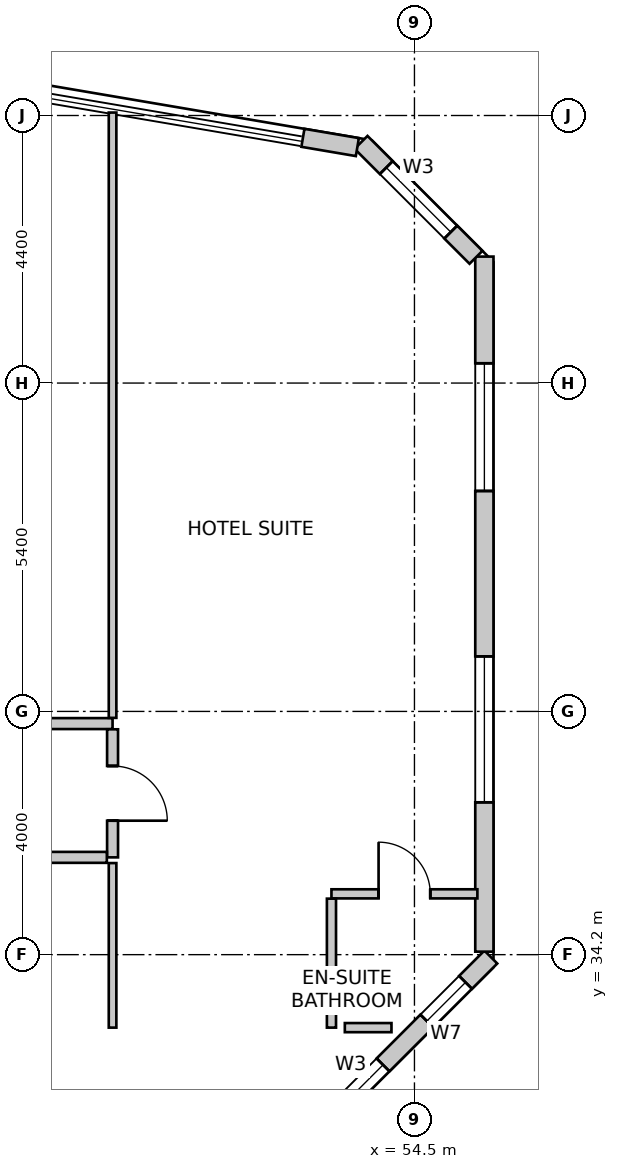
"""IFC4 building model, lengths in metres.
Left out: names, types, materials, properties, quantities, classifications, styles, units other than length and angle.
Written with IfcOpenShell. Run it as: python <this file> out.ifc"""

import sys

from ifc_helpers import new_model, si_unit, direction, frame, frame_2d, origin, place, context, subcontext, project, spatial, rectangle, extrude, source, transform, mapped, element, fill, save


model = new_model("IFC4")
c1 = context("Model", 3, precision=1e-05, world=origin(), true_north=direction((0.0, 1.0)))
c2 = subcontext(c1, "Body", "Model", "MODEL_VIEW")
j1 = project(units=[si_unit("LENGTHUNIT", "METRE"), si_unit("PLANEANGLEUNIT", "RADIAN")], contexts=[c1])
p1 = place(None, origin())
s1 = spatial("IfcSite", under=j1, at=p1, CompositionType="ELEMENT")
p2 = place(p1, origin())
s2 = spatial("IfcBuilding", under=s1, at=p2, CompositionType="ELEMENT")
p3 = place(p2, frame((0.0, 0.0, 146.6)))
s3 = spatial("IfcBuildingStorey", under=s2, at=p3, CompositionType="ELEMENT", Elevation=146.6)
p4 = place(p3, frame((52.476, 30.88, 0.0), z_axis=(0.0, 0.0, 1.0), x_axis=(0.707106781187, 0.707106781187, 0.0)))
e1 = element("IfcWall", 1, at=p4, inside=s3, PredefinedType="SOLIDWALL", context=c2, shape_type="SweptSolid", body=[
    extrude(rectangle(XDim=4.639, YDim=0.3, at=frame_2d((2.319, 0.0))), origin(), (0.0, 0.0, 1.0), 3.35),
])
m1 = source(origin(), c2, "Body", "SweptSolid", [
    extrude(rectangle(XDim=1.5, YDim=1.8, at=frame_2d((0.75, 0.9))), frame((0.0, 0.16, 0.0), z_axis=(0.0, -1.0, 0.0), x_axis=(1.0, 0.0, 0.0)), (0.0, 0.0, 1.0), 0.32),
])
p5 = place(p4, frame((0.632, 0.0, 0.85)))
e2 = element("IfcOpeningElement", 2, at=p5, cuts=e1, PredefinedType="OPENING", context=c2, shape_type="MappedRepresentation", body=[
    mapped(m1, transform((0.0, 0.0, 0.0), scale=1.0)),
])
m2 = source(origin(), c2, "Body", "SweptSolid", [
    extrude(rectangle(XDim=0.9, YDim=1.6, at=frame_2d((0.45, 0.8))), frame((0.0, 0.16, 0.0), z_axis=(0.0, -1.0, 0.0), x_axis=(1.0, 0.0, 0.0)), (0.0, 0.0, 1.0), 0.32),
])
p6 = place(p4, frame((3.151, 0.0, 0.85)))
e3 = element("IfcOpeningElement", 3, at=p6, cuts=e1, PredefinedType="OPENING", context=c2, shape_type="MappedRepresentation", body=[
    mapped(m2, transform((0.0, 0.0, 0.0), scale=1.0)),
])
p7 = place(p3, frame((55.65, 34.249, 0.0), z_axis=(0.0, 0.0, 1.0), x_axis=(0.0, 1.0, 0.0)))
e4 = element("IfcWall", 4, at=p7, inside=s3, PredefinedType="SOLIDWALL", context=c2, shape_type="SweptSolid", body=[
    extrude(rectangle(XDim=11.431, YDim=0.3, at=frame_2d((5.715, 0.0))), origin(), (0.0, 0.0, 1.0), 3.35),
])
m3 = source(origin(), c2, "Body", "SweptSolid", [
    extrude(rectangle(XDim=2.4, YDim=2.2, at=frame_2d((1.2, 1.1))), frame((0.0, 0.16, 0.0), z_axis=(0.0, -1.0, 0.0), x_axis=(1.0, 0.0, 0.0)), (0.0, 0.0, 1.0), 0.32),
])
p8 = place(p7, frame((2.456, 0.0, 0.85)))
e5 = element("IfcOpeningElement", 5, at=p8, cuts=e4, PredefinedType="OPENING", context=c2, shape_type="MappedRepresentation", body=[
    mapped(m3, transform((0.0, 0.0, 0.0), scale=1.0)),
])
m4 = source(origin(), c2, "Body", "SweptSolid", [
    extrude(rectangle(XDim=2.1, YDim=2.0, at=frame_2d((1.05, 1.0))), frame((0.0, 0.16, 0.0), z_axis=(0.0, -1.0, 0.0), x_axis=(1.0, 0.0, 0.0)), (0.0, 0.0, 1.0), 0.32),
])
p9 = place(p7, frame((7.576, 0.0, 0.85)))
e6 = element("IfcOpeningElement", 6, at=p9, cuts=e4, PredefinedType="OPENING", context=c2, shape_type="MappedRepresentation", body=[
    mapped(m4, transform((0.0, 0.0, 0.0), scale=1.0)),
])
p10 = place(p3, frame((55.512, 45.668, 0.0), z_axis=(0.0, 0.0, 1.0), x_axis=(-0.707152443695, 0.707061115729, 0.0)))
e7 = element("IfcWall", 7, at=p10, inside=s3, PredefinedType="SOLIDWALL", context=c2, shape_type="SweptSolid", body=[
    extrude(rectangle(XDim=2.673, YDim=0.3, at=frame_2d((1.337, 0.0))), origin(), (0.0, 0.0, 1.0), 3.35),
])
p11 = place(p10, frame((0.587, 0.0, 0.85)))
e8 = element("IfcOpeningElement", 8, at=p11, cuts=e7, PredefinedType="OPENING", context=c2, shape_type="MappedRepresentation", body=[
    mapped(m1, transform((0.0, 0.0, 0.0), scale=1.0)),
])
p12 = place(p3, frame((53.561, 47.48, 0.0), z_axis=(0.0, 0.0, 1.0), x_axis=(-0.985836300899, 0.167710428506, 0.0)))
e9 = element("IfcWall", 9, at=p12, inside=s3, PredefinedType="SOLIDWALL", context=c2, shape_type="SweptSolid", body=[
    extrude(rectangle(XDim=0.908, YDim=0.3, at=frame_2d((0.454, 0.0))), origin(), (0.0, 0.0, 1.0), 3.35),
])
p13 = place(p3, frame((41.829, 38.0, 0.0), z_axis=(0.0, 0.0, 1.0), x_axis=(1.0, 0.0, 0.0)))
e10 = element("IfcWall", 10, at=p13, inside=s3, PredefinedType="PARTITIONING", context=c2, shape_type="SweptSolid", body=[
    extrude(rectangle(XDim=7.706, YDim=0.18, at=frame_2d((3.853, 0.0))), origin(), (0.0, 0.0, 1.0), 2.788),
])
m5 = source(origin(), c2, "Body", "SweptSolid", [
    extrude(rectangle(XDim=0.9, YDim=2.15, at=frame_2d((0.45, 1.075))), frame((0.0, 0.1, 0.0), z_axis=(0.0, -1.0, 0.0), x_axis=(1.0, 0.0, 0.0)), (0.0, 0.0, 1.0), 0.2),
])
p14 = place(p13, frame((3.403, 0.0, 0.0)))
e11 = element("IfcOpeningElement", 11, at=p14, cuts=e10, PredefinedType="OPENING", context=c2, shape_type="MappedRepresentation", body=[
    mapped(m5, transform((0.0, 0.0, 0.0), scale=1.0)),
])
p15 = place(p3, frame((49.535, 37.906, 0.0), z_axis=(0.0, 0.0, 1.0), x_axis=(0.0, -1.0, 0.0)))
e12 = element("IfcWall", 12, at=p15, inside=s3, PredefinedType="PARTITIONING", context=c2, shape_type="SweptSolid", body=[
    extrude(rectangle(XDim=2.106, YDim=0.18, at=frame_2d((1.053, 0.0))), origin(), (0.0, 0.0, 1.0), 3.35),
])
p16 = place(p15, frame((0.603, 0.0, 0.0)))
e13 = element("IfcOpeningElement", 13, at=p16, cuts=e12, PredefinedType="OPENING", context=c2, shape_type="MappedRepresentation", body=[
    mapped(m5, transform((0.0, 0.0, 0.0), scale=1.0)),
])
p17 = place(p3, frame((49.441, 35.8, 0.0), z_axis=(0.0, 0.0, 1.0), x_axis=(-1.0, 0.0, 0.0)))
e14 = element("IfcWall", 14, at=p17, inside=s3, PredefinedType="PARTITIONING", context=c2, shape_type="SweptSolid", body=[
    extrude(rectangle(XDim=15.641, YDim=0.18, at=frame_2d((7.82, 0.0))), origin(), (0.0, 0.0, 1.0), 2.788),
])
p18 = place(p17, frame((7.371, 0.0, 0.0)))
e15 = element("IfcOpeningElement", 15, at=p18, cuts=e14, PredefinedType="OPENING", context=c2, shape_type="MappedRepresentation", body=[
    mapped(m5, transform((0.0, 0.0, 0.0), scale=1.0)),
])
p19 = place(p3, frame((49.535, 48.049, 0.0), z_axis=(0.0, 0.0, 1.0), x_axis=(0.0, -1.0, 0.0)))
e16 = element("IfcWall", 16, at=p19, inside=s3, PredefinedType="PARTITIONING", context=c2, shape_type="SweptSolid", body=[
    extrude(rectangle(XDim=9.955, YDim=0.125, at=frame_2d((4.977, 0.0))), origin(), (0.0, 0.0, 1.0), 3.35),
])
p20 = place(p3, frame((53.135, 35.2, 0.0), z_axis=(0.0, 0.0, 1.0), x_axis=(1.0, 0.0, 0.0)))
e17 = element("IfcWall", 17, at=p20, inside=s3, PredefinedType="PARTITIONING", context=c2, shape_type="SweptSolid", body=[
    extrude(rectangle(XDim=2.4, YDim=0.15, at=frame_2d((1.2, 0.0))), origin(), (0.0, 0.0, 1.0), 3.35),
])
m6 = source(origin(), c2, "Body", "SweptSolid", [
    extrude(rectangle(XDim=0.85, YDim=2.15, at=frame_2d((0.425, 1.075))), frame((0.0, 0.085, 0.0), z_axis=(0.0, -1.0, 0.0), x_axis=(1.0, 0.0, 0.0)), (0.0, 0.0, 1.0), 0.17),
])
p21 = place(p20, frame((0.775, 0.0, 0.0)))
e18 = element("IfcOpeningElement", 18, at=p21, cuts=e17, PredefinedType="OPENING", context=c2, shape_type="MappedRepresentation", body=[
    mapped(m6, transform((0.0, 0.0, 0.0), scale=1.0)),
])
p22 = place(p3, frame((53.135, 33.0, 0.0), z_axis=(0.0, 0.0, 1.0), x_axis=(0.0, 1.0, 0.0)))
e19 = element("IfcWall", 19, at=p22, inside=s3, PredefinedType="PARTITIONING", context=c2, shape_type="SweptSolid", body=[
    extrude(rectangle(XDim=2.121, YDim=0.15, at=frame_2d((1.061, 0.0))), origin(), (0.0, 0.0, 1.0), 3.35),
])
p23 = place(p3, frame((49.535, 33.0, 0.0), z_axis=(0.0, 0.0, 1.0), x_axis=(0.0, 1.0, 0.0)))
e20 = element("IfcWall", 20, at=p23, inside=s3, PredefinedType="PARTITIONING", context=c2, shape_type="SweptSolid", body=[
    extrude(rectangle(XDim=2.706, YDim=0.125, at=frame_2d((1.353, 0.0))), origin(), (0.0, 0.0, 1.0), 3.35),
])
p24 = place(p3, frame((54.122, 33.0, 0.0), z_axis=(0.0, 0.0, 1.0), x_axis=(-1.0, 0.0, 0.0)))
e21 = element("IfcWall", 21, at=p24, inside=s3, PredefinedType="PARTITIONING", context=c2, shape_type="SweptSolid", body=[
    extrude(rectangle(XDim=0.767, YDim=0.15, at=frame_2d((0.384, 0.0))), origin(), (0.0, 0.0, 1.0), 3.35),
])
m7 = source(origin(), c2, "Body", "SweptSolid", [
    extrude(rectangle(XDim=1.5, YDim=1.8, at=frame_2d((0.75, 0.9))), frame((0.0, -0.015, 0.0), z_axis=(0.0, -1.0, 0.0), x_axis=(1.0, 0.0, 0.0)), (0.0, 0.0, 1.0), 0.06),
])
p25 = place(p5, origin())
e22 = element("IfcWindow", 22, at=p25, inside=s3, PartitioningType="SINGLE_PANEL", PredefinedType="WINDOW", context=c2, shape_type="MappedRepresentation", body=[
    mapped(m7, transform((0.0, 0.0, 0.0), scale=1.0)),
])
fill(e2, e22)
m8 = source(origin(), c2, "Body", "SweptSolid", [
    extrude(rectangle(XDim=0.9, YDim=1.6, at=frame_2d((0.45, 0.8))), frame((0.0, -0.015, 0.0), z_axis=(0.0, -1.0, 0.0), x_axis=(1.0, 0.0, 0.0)), (0.0, 0.0, 1.0), 0.06),
])
p26 = place(p6, origin())
e23 = element("IfcWindow", 23, at=p26, inside=s3, PartitioningType="SINGLE_PANEL", PredefinedType="WINDOW", context=c2, shape_type="MappedRepresentation", body=[
    mapped(m8, transform((0.0, 0.0, 0.0), scale=1.0)),
])
fill(e3, e23)
m9 = source(origin(), c2, "Body", "SweptSolid", [
    extrude(rectangle(XDim=2.4, YDim=2.2, at=frame_2d((1.2, 1.1))), frame((0.0, -0.015, 0.0), z_axis=(0.0, -1.0, 0.0), x_axis=(1.0, 0.0, 0.0)), (0.0, 0.0, 1.0), 0.06),
])
p27 = place(p8, origin())
e24 = element("IfcWindow", 24, at=p27, inside=s3, PartitioningType="SINGLE_PANEL", PredefinedType="WINDOW", context=c2, shape_type="MappedRepresentation", body=[
    mapped(m9, transform((0.0, 0.0, 0.0), scale=1.0)),
])
fill(e5, e24)
m10 = source(origin(), c2, "Body", "SweptSolid", [
    extrude(rectangle(XDim=2.1, YDim=2.0, at=frame_2d((1.05, 1.0))), frame((0.0, -0.015, 0.0), z_axis=(0.0, -1.0, 0.0), x_axis=(1.0, 0.0, 0.0)), (0.0, 0.0, 1.0), 0.06),
])
p28 = place(p9, origin())
e25 = element("IfcWindow", 25, at=p28, inside=s3, PartitioningType="SINGLE_PANEL", PredefinedType="WINDOW", context=c2, shape_type="MappedRepresentation", body=[
    mapped(m10, transform((0.0, 0.0, 0.0), scale=1.0)),
])
fill(e6, e25)
p29 = place(p11, origin())
e26 = element("IfcWindow", 26, at=p29, inside=s3, PartitioningType="SINGLE_PANEL", PredefinedType="WINDOW", context=c2, shape_type="MappedRepresentation", body=[
    mapped(m7, transform((0.0, 0.0, 0.0), scale=1.0)),
])
fill(e8, e26)
m11 = source(origin(), c2, "Body", "SweptSolid", [
    extrude(rectangle(XDim=0.85, YDim=2.15, at=frame_2d((0.425, 1.075))), frame((0.0, 0.025, 0.0), z_axis=(0.0, -1.0, 0.0), x_axis=(1.0, 0.0, 0.0)), (0.0, 0.0, 1.0), 0.05),
])
p30 = place(p21, origin())
e27 = element("IfcDoor", 27, at=p30, inside=s3, OperationType="SINGLE_SWING_LEFT", PredefinedType="DOOR", context=c2, shape_type="MappedRepresentation", body=[
    mapped(m11, transform((0.0, 0.0, 0.0), scale=1.0)),
])
fill(e18, e27)
m12 = source(origin(), c2, "Body", "SweptSolid", [
    extrude(rectangle(XDim=0.9, YDim=2.15, at=frame_2d((0.45, 1.075))), frame((0.0, 0.025, 0.0), z_axis=(0.0, -1.0, 0.0), x_axis=(1.0, 0.0, 0.0)), (0.0, 0.0, 1.0), 0.05),
])
p31 = place(p16, origin())
e28 = element("IfcDoor", 28, at=p31, inside=s3, OperationType="SINGLE_SWING_RIGHT", PredefinedType="DOOR", context=c2, shape_type="MappedRepresentation", body=[
    mapped(m12, transform((0.0, 0.0, 0.0), scale=1.0)),
])
fill(e13, e28)
save(model, sys.argv[1])
